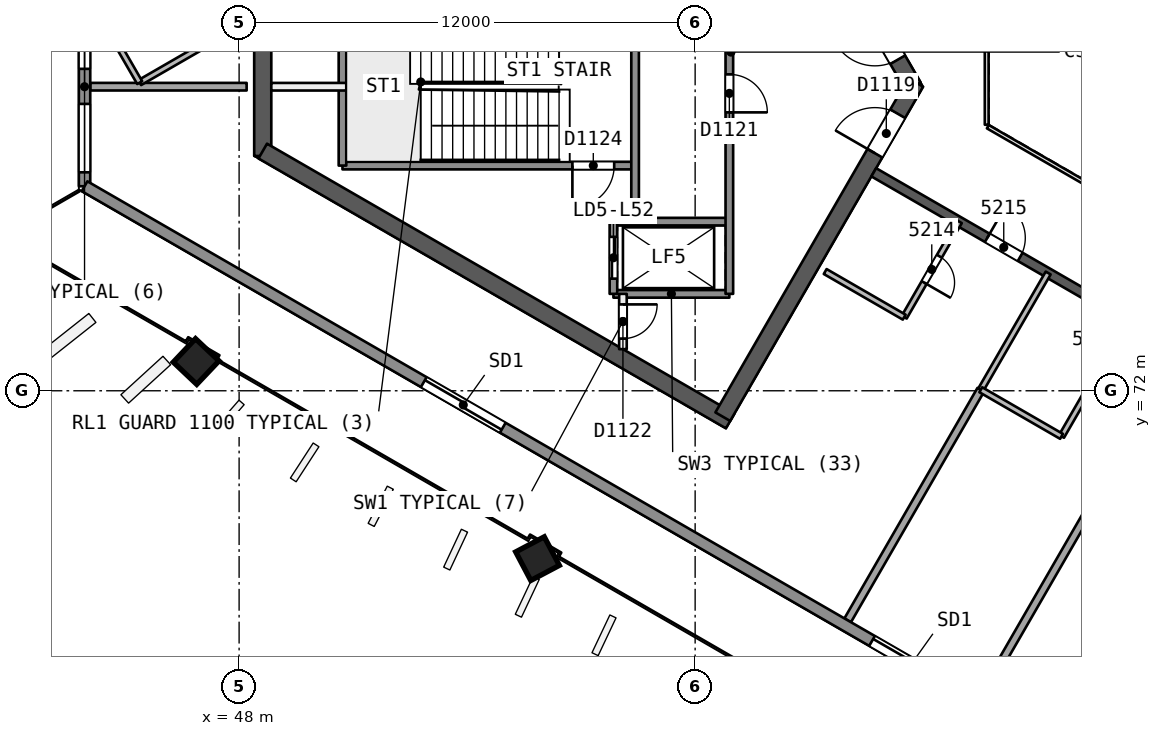
"""IFC4 building model, lengths in metres.
Left out: names, types, materials, properties, quantities, classifications, styles, units other than length and angle.
Written with IfcOpenShell. Run it as: python <this file> out.ifc"""

import sys

from ifc_helpers import new_model, si_unit, direction, frame, frame_2d, origin, origin_2d, place, context, subcontext, project, spatial, rectangle, extrude, element, fill, save


model = new_model("IFC4")
c1 = context("Model", 3, precision=1e-05, world=origin(), true_north=direction((0.0, 1.0)))
c2 = subcontext(c1, "Body", "Model", "MODEL_VIEW")
j1 = project(units=[si_unit("LENGTHUNIT", "METRE"), si_unit("PLANEANGLEUNIT", "RADIAN")], contexts=[c1])
p1 = place(None, origin())
s1 = spatial("IfcSite", under=j1, at=p1, CompositionType="ELEMENT")
p2 = place(p1, origin())
s2 = spatial("IfcBuilding", under=s1, at=p2, CompositionType="ELEMENT")
p3 = place(p2, frame((0.0, 0.0, 213.2)))
s3 = spatial("IfcBuildingStorey", under=s2, at=p3, CompositionType="ELEMENT", Elevation=213.2)
p4 = place(p3, frame((65.74, 80.0, 0.0), z_axis=(0.0, 0.0, 1.0), x_axis=(-0.499991857942, 0.866030104553, 0.0)))
e1 = element("IfcWall", 1, at=p4, inside=s3, PredefinedType="SHEAR", context=c2, shape_type="SweptSolid", body=[
    extrude(rectangle(XDim=10.25, YDim=0.45, at=frame_2d((5.125, 0.0))), origin(), (0.0, 0.0, 1.0), 3.7),
])
p5 = place(p4, frame((0.82, 0.0, 0.0)))
e2 = element("IfcOpeningElement", 2, at=p5, cuts=e1, PredefinedType="OPENING", context=c2, shape_type="SweptSolid", body=[
    extrude(rectangle(XDim=1.2, YDim=2.1, at=frame_2d((0.6, 1.05))), frame((0.0, 0.235, 0.0), z_axis=(0.0, -1.0, 0.0), x_axis=(1.0, 0.0, 0.0)), (0.0, 0.0, 1.0), 0.471),
])
p6 = place(p3, frame((48.622, 81.693, 0.0), z_axis=(0.0, 0.0, 1.0), x_axis=(0.0, -1.0, 0.0)))
e3 = element("IfcWall", 3, at=p6, inside=s3, PredefinedType="SHEAR", context=c2, shape_type="SweptSolid", body=[
    extrude(rectangle(XDim=3.515, YDim=0.45, at=frame_2d((1.758, 0.0))), origin(), (0.0, 0.0, 1.0), 3.7),
])
p7 = place(p3, frame((48.622, 78.307, 0.0), z_axis=(0.0, 0.0, 1.0), x_axis=(0.86602701116, -0.499997215934, 0.0)))
e4 = element("IfcWall", 4, at=p7, inside=s3, PredefinedType="SHEAR", context=c2, shape_type="SweptSolid", body=[
    extrude(rectangle(XDim=14.204, YDim=0.45, at=frame_2d((7.102, 0.0))), origin(), (0.0, 0.0, 1.0), 3.7),
])
p8 = place(p3, frame((60.728, 71.318, 0.0), z_axis=(0.0, 0.0, 1.0), x_axis=(0.500012416173, 0.866018235185, 0.0)))
e5 = element("IfcWall", 5, at=p8, inside=s3, PredefinedType="SHEAR", context=c2, shape_type="SweptSolid", body=[
    extrude(rectangle(XDim=10.155, YDim=0.45, at=frame_2d((5.078, 0.0))), origin(), (0.0, 0.0, 1.0), 3.7),
])
p9 = place(p8, frame((8.005, 0.0, 0.0)))
e6 = element("IfcOpeningElement", 6, at=p9, cuts=e5, PredefinedType="OPENING", context=c2, shape_type="SweptSolid", body=[
    extrude(rectangle(XDim=1.2, YDim=2.1, at=frame_2d((0.6, 1.05))), frame((0.0, 0.235, 0.0), z_axis=(0.0, -1.0, 0.0), x_axis=(1.0, 0.0, 0.0)), (0.0, 0.0, 1.0), 0.471),
])
p10 = place(p3, frame((64.7, 77.748, 0.0), z_axis=(0.0, 0.0, 1.0), x_axis=(0.866026492143, -0.499998114903, 0.0)))
e7 = element("IfcWall", 7, at=p10, inside=s3, PredefinedType="SHEAR", context=c2, shape_type="SweptSolid", body=[
    extrude(rectangle(XDim=15.588, YDim=0.25, at=frame_2d((7.794, 0.0))), origin(), (0.0, 0.0, 1.0), 3.3),
])
p11 = place(p10, frame((3.45, 0.0, 0.0)))
e8 = element("IfcOpeningElement", 8, at=p11, cuts=e7, PredefinedType="OPENING", context=c2, shape_type="SweptSolid", body=[
    extrude(rectangle(XDim=1.0, YDim=2.1, at=frame_2d((0.5, 1.05))), frame((0.0, 0.135, 0.0), z_axis=(0.0, -1.0, 0.0), x_axis=(1.0, 0.0, 0.0)), (0.0, 0.0, 1.0), 0.271),
])
p12 = place(p10, frame((8.003, 0.0, 0.0)))
e9 = element("IfcOpeningElement", 9, at=p12, cuts=e7, PredefinedType="OPENING", context=c2, shape_type="SweptSolid", body=[
    extrude(rectangle(XDim=1.1, YDim=2.1, at=frame_2d((0.55, 1.05))), frame((0.0, 0.135, 0.0), z_axis=(0.0, -1.0, 0.0), x_axis=(1.0, 0.0, 0.0)), (0.0, 0.0, 1.0), 0.271),
])
p13 = place(p10, frame((11.971, 0.0, 0.0)))
e10 = element("IfcOpeningElement", 10, at=p13, cuts=e7, PredefinedType="OPENING", context=c2, shape_type="SweptSolid", body=[
    extrude(rectangle(XDim=1.0, YDim=2.1, at=frame_2d((0.5, 1.05))), frame((0.0, 0.135, 0.0), z_axis=(0.0, -1.0, 0.0), x_axis=(1.0, 0.0, 0.0)), (0.0, 0.0, 1.0), 0.271),
])
p14 = place(p3, frame((46.835, 72.761, 0.0), z_axis=(0.02855911485, 0.006793507689, 0.999569019734), x_axis=(-0.865318766308, 0.500768301983, 0.021319953197)))
e11 = element("IfcColumn", 11, at=p14, inside=s3, PredefinedType="COLUMN", context=c2, shape_type="SweptSolid", body=[
    extrude(rectangle(XDim=0.85, YDim=0.85, at=origin_2d()), origin(), (0.0, 0.0, 1.0), 3.702),
])
p15 = place(p3, frame((55.83, 67.568, 0.0), z_axis=(0.019328516974, 0.012138044789, 0.999739504221), x_axis=(-0.865690909737, 0.500465383244, 0.010660627254)))
e12 = element("IfcColumn", 12, at=p15, inside=s3, PredefinedType="COLUMN", context=c2, shape_type="SweptSolid", body=[
    extrude(rectangle(XDim=0.85, YDim=0.85, at=origin_2d()), origin(), (0.0, 0.0, 1.0), 3.701),
])
p16 = place(p3, frame((47.636, 81.408, 0.0), z_axis=(0.0, 0.0, 1.0), x_axis=(-0.866021400173, -0.500006934395, 0.0)))
e13 = element("IfcWall", 13, at=p16, inside=s3, PredefinedType="PARTITIONING", context=c2, shape_type="SweptSolid", body=[
    extrude(rectangle(XDim=2.6, YDim=0.15, at=frame_2d((1.3, 0.0))), origin(), (0.0, 0.0, 1.0), 3.3),
])
p17 = place(p3, frame((45.384, 80.108, 0.0), z_axis=(0.0, 0.0, 1.0), x_axis=(-0.499949632511, 0.866054481515, 0.0)))
e14 = element("IfcWall", 14, at=p17, inside=s3, PredefinedType="PARTITIONING", context=c2, shape_type="SweptSolid", body=[
    extrude(rectangle(XDim=2.605, YDim=0.15, at=frame_2d((1.302, 0.0))), origin(), (0.0, 0.0, 1.0), 3.3),
])
p18 = place(p3, frame((44.082, 80.001, 0.0), z_axis=(0.0, 0.0, 1.0), x_axis=(1.0, 0.0, 0.0)))
e15 = element("IfcWall", 15, at=p18, inside=s3, PredefinedType="PARTITIONING", context=c2, shape_type="SweptSolid", body=[
    extrude(rectangle(XDim=4.116, YDim=0.2, at=frame_2d((2.058, 0.0))), origin(), (0.0, 0.0, 1.0), 3.3),
])
p19 = place(p3, frame((66.952, 76.448, 0.0), z_axis=(0.0, 0.0, 1.0), x_axis=(-0.499987231761, -0.866032775405, 0.0)))
e16 = element("IfcWall", 16, at=p19, inside=s3, PredefinedType="PARTITIONING", context=c2, shape_type="SweptSolid", body=[
    extrude(rectangle(XDim=2.9, YDim=0.15, at=frame_2d((1.45, 0.0))), origin(), (0.0, 0.0, 1.0), 3.3),
])
p20 = place(p19, frame((1.05, 0.0, 0.0)))
e17 = element("IfcOpeningElement", 17, at=p20, cuts=e16, PredefinedType="OPENING", context=c2, shape_type="SweptSolid", body=[
    extrude(rectangle(XDim=0.8, YDim=2.1, at=frame_2d((0.4, 1.05))), frame((0.0, 0.085, 0.0), z_axis=(0.0, -1.0, 0.0), x_axis=(1.0, 0.0, 0.0)), (0.0, 0.0, 1.0), 0.171),
])
p21 = place(p3, frame((65.502, 73.937, 0.0), z_axis=(0.0, 0.0, 1.0), x_axis=(-0.865994240961, 0.500053971709, 0.0)))
e18 = element("IfcWall", 18, at=p21, inside=s3, PredefinedType="PARTITIONING", context=c2, shape_type="SweptSolid", body=[
    extrude(rectangle(XDim=2.401, YDim=0.15, at=frame_2d((1.201, 0.0))), origin(), (0.0, 0.0, 1.0), 3.3),
])
p22 = place(p3, frame((64.014, 65.96, 0.0), z_axis=(0.0, 0.0, 1.0), x_axis=(0.499980879723, 0.8660364426, 0.0)))
e19 = element("IfcWall", 19, at=p22, inside=s3, PredefinedType="PARTITIONING", context=c2, shape_type="SweptSolid", body=[
    extrude(rectangle(XDim=7.006, YDim=0.2, at=frame_2d((3.503, 0.0))), origin(), (0.0, 0.0, 1.0), 3.3),
])
p23 = place(p3, frame((67.517, 72.027, 0.0), z_axis=(0.0, 0.0, 1.0), x_axis=(0.500018392462, 0.866014784631, 0.0)))
e20 = element("IfcWall", 20, at=p23, inside=s3, PredefinedType="PARTITIONING", context=c2, shape_type="SweptSolid", body=[
    extrude(rectangle(XDim=3.547, YDim=0.15, at=frame_2d((1.773, 0.0))), origin(), (0.0, 0.0, 1.0), 3.3),
])
p24 = place(p3, frame((71.414, 73.872, 0.0), z_axis=(0.0, 0.0, 1.0), x_axis=(-0.499966764714, -0.866044591335, 0.0)))
e21 = element("IfcWall", 21, at=p24, inside=s3, PredefinedType="PARTITIONING", context=c2, shape_type="SweptSolid", body=[
    extrude(rectangle(XDim=3.547, YDim=0.15, at=frame_2d((1.773, 0.0))), origin(), (0.0, 0.0, 1.0), 3.3),
])
p25 = place(p24, frame((1.323, 0.0, 0.0)))
e22 = element("IfcOpeningElement", 22, at=p25, cuts=e21, PredefinedType="OPENING", context=c2, shape_type="SweptSolid", body=[
    extrude(rectangle(XDim=0.9, YDim=2.1, at=frame_2d((0.45, 1.05))), frame((0.0, 0.085, 0.0), z_axis=(0.0, -1.0, 0.0), x_axis=(1.0, 0.0, 0.0)), (0.0, 0.0, 1.0), 0.171),
])
p26 = place(p3, frame((69.641, 70.8, 0.0), z_axis=(0.0, 0.0, 1.0), x_axis=(-0.866029801145, 0.49999238347, 0.0)))
e23 = element("IfcWall", 23, at=p26, inside=s3, PredefinedType="PARTITIONING", context=c2, shape_type="SweptSolid", body=[
    extrude(rectangle(XDim=2.453, YDim=0.15, at=frame_2d((1.227, 0.0))), origin(), (0.0, 0.0, 1.0), 3.3),
])
p27 = place(p3, frame((67.524, 63.933, 0.0), z_axis=(0.0, 0.0, 1.0), x_axis=(0.499993488173, 0.866029163357, 0.0)))
e24 = element("IfcWall", 24, at=p27, inside=s3, PredefinedType="PARTITIONING", context=c2, shape_type="SweptSolid", body=[
    extrude(rectangle(XDim=10.552, YDim=0.2, at=frame_2d((5.276, 0.0))), origin(), (0.0, 0.0, 1.0), 3.3),
])
p28 = place(p3, frame((43.933, 77.381, 0.0), z_axis=(0.0, 0.0, 1.0), x_axis=(0.0, 1.0, 0.0)))
e25 = element("IfcWall", 25, at=p28, inside=s3, PredefinedType="SOLIDWALL", context=c2, shape_type="SweptSolid", body=[
    extrude(rectangle(XDim=5.237, YDim=0.3, at=frame_2d((2.619, 0.0))), origin(), (0.0, 0.0, 1.0), 3.3),
])
p29 = place(p28, frame((3.089, 0.0, 0.9)))
e26 = element("IfcOpeningElement", 26, at=p29, cuts=e25, PredefinedType="OPENING", context=c2, shape_type="SweptSolid", body=[
    extrude(rectangle(XDim=1.8, YDim=1.5, at=frame_2d((0.9, 0.75))), frame((0.0, 0.161, 0.0), z_axis=(0.0, -1.0, 0.0), x_axis=(1.0, 0.0, 0.0)), (0.0, 0.0, 1.0), 0.321),
])
p30 = place(p28, frame((0.366, 0.0, 0.9)))
e27 = element("IfcOpeningElement", 27, at=p30, cuts=e25, PredefinedType="OPENING", context=c2, shape_type="SweptSolid", body=[
    extrude(rectangle(XDim=1.8, YDim=1.5, at=frame_2d((0.9, 0.75))), frame((0.0, 0.161, 0.0), z_axis=(0.0, -1.0, 0.0), x_axis=(1.0, 0.0, 0.0)), (0.0, 0.0, 1.0), 0.321),
])
p31 = place(p3, frame((88.266, 51.786, 0.0), z_axis=(0.0, 0.0, 1.0), x_axis=(-0.866026349667, 0.49999836168, 0.0)))
e28 = element("IfcWall", 28, at=p31, inside=s3, PredefinedType="SOLIDWALL", context=c2, shape_type="SweptSolid", body=[
    extrude(rectangle(XDim=51.192, YDim=0.3, at=frame_2d((25.596, 0.0))), origin(), (0.0, 0.0, 1.0), 3.3),
])
p32 = place(p31, frame((24.864, 0.0, 0.0)))
e29 = element("IfcOpeningElement", 29, at=p32, cuts=e28, PredefinedType="OPENING", context=c2, shape_type="SweptSolid", body=[
    extrude(rectangle(XDim=2.4, YDim=2.4, at=frame_2d((1.2, 1.2))), frame((0.0, 0.161, 0.0), z_axis=(0.0, -1.0, 0.0), x_axis=(1.0, 0.0, 0.0)), (0.0, 0.0, 1.0), 0.321),
])
p33 = place(p31, frame((19.719, 0.0, 0.0)))
e30 = element("IfcOpeningElement", 30, at=p33, cuts=e28, PredefinedType="OPENING", context=c2, shape_type="SweptSolid", body=[
    extrude(rectangle(XDim=2.4, YDim=2.4, at=frame_2d((1.2, 1.2))), frame((0.0, 0.161, 0.0), z_axis=(0.0, -1.0, 0.0), x_axis=(1.0, 0.0, 0.0)), (0.0, 0.0, 1.0), 0.321),
])
p34 = place(p31, frame((8.993, 0.0, 0.0)))
e31 = element("IfcOpeningElement", 31, at=p34, cuts=e28, PredefinedType="OPENING", context=c2, shape_type="SweptSolid", body=[
    extrude(rectangle(XDim=2.4, YDim=2.4, at=frame_2d((1.2, 1.2))), frame((0.0, 0.161, 0.0), z_axis=(0.0, -1.0, 0.0), x_axis=(1.0, 0.0, 0.0)), (0.0, 0.0, 1.0), 0.321),
])
p35 = place(p31, frame((38.484, 0.0, 0.0)))
e32 = element("IfcOpeningElement", 32, at=p35, cuts=e28, PredefinedType="OPENING", context=c2, shape_type="SweptSolid", body=[
    extrude(rectangle(XDim=2.4, YDim=2.4, at=frame_2d((1.2, 1.2))), frame((0.0, 0.161, 0.0), z_axis=(0.0, -1.0, 0.0), x_axis=(1.0, 0.0, 0.0)), (0.0, 0.0, 1.0), 0.321),
])
p36 = place(p3, frame((50.82, 80.0, 0.0), z_axis=(0.0, 0.0, 1.0), x_axis=(-1.0, 0.0, 0.0)))
e33 = element("IfcWall", 33, at=p36, inside=s3, PredefinedType="PARTITIONING", context=c2, shape_type="SweptSolid", body=[
    extrude(rectangle(XDim=1.973, YDim=0.2, at=frame_2d((0.987, 0.0))), origin(), (0.0, 0.0, 1.0), 3.3),
])
p37 = place(p3, frame((58.42, 77.925, 0.0), z_axis=(0.0, 0.0, 1.0), x_axis=(-1.0, 0.0, 0.0)))
e34 = element("IfcWall", 34, at=p37, inside=s3, PredefinedType="SOLIDWALL", context=c2, shape_type="SweptSolid", body=[
    extrude(rectangle(XDim=7.7, YDim=0.2, at=frame_2d((3.85, 0.0))), origin(), (0.0, 0.0, 1.0), 3.3),
])
p38 = place(p37, frame((0.55, 0.0, 0.0)))
e35 = element("IfcOpeningElement", 35, at=p38, cuts=e34, PredefinedType="OPENING", context=c2, shape_type="SweptSolid", body=[
    extrude(rectangle(XDim=1.1, YDim=2.1, at=frame_2d((0.55, 1.05))), frame((0.0, 0.11, 0.0), z_axis=(0.0, -1.0, 0.0), x_axis=(1.0, 0.0, 0.0)), (0.0, 0.0, 1.0), 0.221),
])
for number, where, z_axis, x_axis in (
    (36, (60.9, 76.45, 0.0), (0.0, 0.0, 1.0), (-1.0, 0.0, 0.0)),
    (37, (60.9, 74.55, 0.0), (0.0, 0.0, 1.0), (-1.0, 0.0, 0.0)),
):
    element("IfcWall", number, at=place(p3, frame(where, z_axis=z_axis, x_axis=x_axis)), inside=s3, PredefinedType="SOLIDWALL", context=c2, shape_type="SweptSolid", body=[
        extrude(rectangle(XDim=3.05, YDim=0.2, at=frame_2d((1.525, 0.0))), origin(), (0.0, 0.0, 1.0), 3.3),
    ])
p39 = place(p3, frame((60.9, 85.45, 0.0), z_axis=(0.0, 0.0, 1.0), x_axis=(0.0, -1.0, 0.0)))
e38 = element("IfcWall", 38, at=p39, inside=s3, PredefinedType="SOLIDWALL", context=c2, shape_type="SweptSolid", body=[
    extrude(rectangle(XDim=10.9, YDim=0.2, at=frame_2d((5.45, 0.0))), origin(), (0.0, 0.0, 1.0), 3.3),
])
p40 = place(p39, frame((0.625, 0.0, 0.0)))
e39 = element("IfcOpeningElement", 39, at=p40, cuts=e38, PredefinedType="OPENING", context=c2, shape_type="SweptSolid", body=[
    extrude(rectangle(XDim=1.0, YDim=2.1, at=frame_2d((0.5, 1.05))), frame((0.0, 0.11, 0.0), z_axis=(0.0, -1.0, 0.0), x_axis=(1.0, 0.0, 0.0)), (0.0, 0.0, 1.0), 0.221),
])
p41 = place(p39, frame((5.125, 0.0, 0.0)))
e40 = element("IfcOpeningElement", 40, at=p41, cuts=e38, PredefinedType="OPENING", context=c2, shape_type="SweptSolid", body=[
    extrude(rectangle(XDim=1.0, YDim=2.1, at=frame_2d((0.5, 1.05))), frame((0.0, 0.11, 0.0), z_axis=(0.0, -1.0, 0.0), x_axis=(1.0, 0.0, 0.0)), (0.0, 0.0, 1.0), 0.221),
])
p42 = place(p3, frame((58.42, 87.09, 0.0), z_axis=(0.0, 0.0, 1.0), x_axis=(0.0, -1.0, 0.0)))
e41 = element("IfcWall", 41, at=p42, inside=s3, PredefinedType="SOLIDWALL", context=c2, shape_type="SweptSolid", body=[
    extrude(rectangle(XDim=10.64, YDim=0.2, at=frame_2d((5.32, 0.0))), origin(), (0.0, 0.0, 1.0), 3.3),
])
p43 = place(p42, frame((0.37, 0.0, 0.0)))
e42 = element("IfcOpeningElement", 42, at=p43, cuts=e41, PredefinedType="OPENING", context=c2, shape_type="SweptSolid", body=[
    extrude(rectangle(XDim=0.9, YDim=2.1, at=frame_2d((0.45, 1.05))), frame((0.0, 0.11, 0.0), z_axis=(0.0, -1.0, 0.0), x_axis=(1.0, 0.0, 0.0)), (0.0, 0.0, 1.0), 0.221),
])
p44 = place(p3, frame((58.1, 74.55, 0.0), z_axis=(0.0, 0.0, 1.0), x_axis=(0.0, -1.0, 0.0)))
e43 = element("IfcWall", 43, at=p44, inside=s3, PredefinedType="PARTITIONING", context=c2, shape_type="SweptSolid", body=[
    extrude(rectangle(XDim=1.455, YDim=0.2, at=frame_2d((0.728, 0.0))), origin(), (0.0, 0.0, 1.0), 3.3),
])
p45 = place(p44, frame((0.278, 0.0, 0.0)))
e44 = element("IfcOpeningElement", 44, at=p45, cuts=e43, PredefinedType="OPENING", context=c2, shape_type="SweptSolid", body=[
    extrude(rectangle(XDim=0.9, YDim=2.1, at=frame_2d((0.45, 1.05))), frame((0.0, 0.11, 0.0), z_axis=(0.0, -1.0, 0.0), x_axis=(1.0, 0.0, 0.0)), (0.0, 0.0, 1.0), 0.221),
])
p46 = place(p3, frame((57.85, 76.45, 0.0), z_axis=(0.0, 0.0, 1.0), x_axis=(0.0, -1.0, 0.0)))
e45 = element("IfcWall", 45, at=p46, inside=s3, PredefinedType="SOLIDWALL", context=c2, shape_type="SweptSolid", body=[
    extrude(rectangle(XDim=1.9, YDim=0.2, at=frame_2d((0.95, 0.0))), origin(), (0.0, 0.0, 1.0), 3.3),
])
p47 = place(p46, frame((0.4, 0.0, 0.0)))
e46 = element("IfcOpeningElement", 46, at=p47, cuts=e45, PredefinedType="OPENING", context=c2, shape_type="SweptSolid", body=[
    extrude(rectangle(XDim=1.1, YDim=2.1, at=frame_2d((0.55, 1.05))), frame((0.0, 0.11, 0.0), z_axis=(0.0, -1.0, 0.0), x_axis=(1.0, 0.0, 0.0)), (0.0, 0.0, 1.0), 0.221),
])
p48 = place(p3, frame((50.72, 82.075, 0.0), z_axis=(0.0, 0.0, 1.0), x_axis=(0.0, -1.0, 0.0)))
e47 = element("IfcWall", 47, at=p48, inside=s3, PredefinedType="SOLIDWALL", context=c2, shape_type="SweptSolid", body=[
    extrude(rectangle(XDim=4.15, YDim=0.2, at=frame_2d((2.075, 0.0))), origin(), (0.0, 0.0, 1.0), 3.3),
])
p49 = place(p3, frame((67.672, 81.0, 0.0), z_axis=(0.0, 0.0, 1.0), x_axis=(0.0, -1.0, 0.0)))
e48 = element("IfcWall", 48, at=p49, inside=s3, PredefinedType="PARTITIONING", context=c2, shape_type="SweptSolid", body=[
    extrude(rectangle(XDim=2.0, YDim=0.1, at=frame_2d((1.0, 0.0))), origin(), (0.0, 0.0, 1.0), 3.3),
])
p50 = place(p3, frame((67.702, 78.948, 0.0), z_axis=(0.0, 0.0, 1.0), x_axis=(0.866026658274, -0.499997827154, 0.0)))
e49 = element("IfcWall", 49, at=p50, inside=s3, PredefinedType="PARTITIONING", context=c2, shape_type="SweptSolid", body=[
    extrude(rectangle(XDim=11.588, YDim=0.1, at=frame_2d((5.794, 0.0))), origin(), (0.0, 0.0, 1.0), 3.3),
])
p51 = place(p20, origin())
e50 = element("IfcDoor", 50, at=p51, inside=s3, OperationType="SINGLE_SWING_RIGHT", PredefinedType="NOTDEFINED", context=c2, shape_type="SweptSolid", body=[
    extrude(rectangle(XDim=0.8, YDim=2.1, at=frame_2d((0.4, 1.05))), frame((0.0, 0.025, 0.0), z_axis=(0.0, -1.0, 0.0), x_axis=(1.0, 0.0, 0.0)), (0.0, 0.0, 1.0), 0.05),
])
fill(e17, e50)
p52 = place(p11, origin())
e51 = element("IfcDoor", 51, at=p52, inside=s3, OperationType="SINGLE_SWING_LEFT", PredefinedType="NOTDEFINED", context=c2, shape_type="SweptSolid", body=[
    extrude(rectangle(XDim=1.0, YDim=2.1, at=frame_2d((0.5, 1.05))), frame((0.0, 0.025, 0.0), z_axis=(0.0, -1.0, 0.0), x_axis=(1.0, 0.0, 0.0)), (0.0, 0.0, 1.0), 0.05),
])
fill(e8, e51)
p53 = place(p29, origin())
e52 = element("IfcWindow", 52, at=p53, inside=s3, PartitioningType="SINGLE_PANEL", PredefinedType="WINDOW", context=c2, shape_type="SweptSolid", body=[
    extrude(rectangle(XDim=1.8, YDim=1.5, at=frame_2d((0.9, 0.75))), frame((0.0, 0.03, 0.0), z_axis=(0.0, -1.0, 0.0), x_axis=(1.0, 0.0, 0.0)), (0.0, 0.0, 1.0), 0.06),
])
fill(e26, e52)
p54 = place(p30, origin())
e53 = element("IfcWindow", 53, at=p54, inside=s3, PartitioningType="SINGLE_PANEL", PredefinedType="WINDOW", context=c2, shape_type="SweptSolid", body=[
    extrude(rectangle(XDim=1.8, YDim=1.5, at=frame_2d((0.9, 0.75))), frame((0.0, 0.03, 0.0), z_axis=(0.0, -1.0, 0.0), x_axis=(1.0, 0.0, 0.0)), (0.0, 0.0, 1.0), 0.06),
])
fill(e27, e53)
p55 = place(p32, origin())
e54 = element("IfcDoor", 54, at=p55, inside=s3, OperationType="SLIDING_TO_LEFT", PredefinedType="NOTDEFINED", context=c2, shape_type="SweptSolid", body=[
    extrude(rectangle(XDim=2.4, YDim=2.4, at=frame_2d((1.2, 1.2))), frame((0.0, 0.025, 0.0), z_axis=(0.0, -1.0, 0.0), x_axis=(1.0, 0.0, 0.0)), (0.0, 0.0, 1.0), 0.05),
])
fill(e29, e54)
p56 = place(p35, origin())
e55 = element("IfcDoor", 55, at=p56, inside=s3, OperationType="SLIDING_TO_RIGHT", PredefinedType="NOTDEFINED", context=c2, shape_type="SweptSolid", body=[
    extrude(rectangle(XDim=2.4, YDim=2.4, at=frame_2d((1.2, 1.2))), frame((0.0, 0.025, 0.0), z_axis=(0.0, -1.0, 0.0), x_axis=(1.0, 0.0, 0.0)), (0.0, 0.0, 1.0), 0.05),
])
fill(e32, e55)
p57 = place(p5, origin())
e56 = element("IfcDoor", 56, at=p57, inside=s3, OperationType="SINGLE_SWING_RIGHT", PredefinedType="NOTDEFINED", context=c2, shape_type="SweptSolid", body=[
    extrude(rectangle(XDim=1.2, YDim=2.1, at=frame_2d((0.6, 1.05))), frame((0.0, 0.025, 0.0), z_axis=(0.0, -1.0, 0.0), x_axis=(1.0, 0.0, 0.0)), (0.0, 0.0, 1.0), 0.05),
])
fill(e2, e56)
p58 = place(p9, origin())
e57 = element("IfcDoor", 57, at=p58, inside=s3, OperationType="SINGLE_SWING_LEFT", PredefinedType="NOTDEFINED", context=c2, shape_type="SweptSolid", body=[
    extrude(rectangle(XDim=1.2, YDim=2.1, at=frame_2d((0.6, 1.05))), frame((0.0, 0.025, 0.0), z_axis=(0.0, -1.0, 0.0), x_axis=(1.0, 0.0, 0.0)), (0.0, 0.0, 1.0), 0.05),
])
fill(e6, e57)
p59 = place(p47, origin())
e58 = element("IfcDoor", 58, at=p59, inside=s3, OperationType="SLIDING_TO_RIGHT", PredefinedType="NOTDEFINED", context=c2, shape_type="SweptSolid", body=[
    extrude(rectangle(XDim=1.1, YDim=2.1, at=frame_2d((0.55, 1.05))), frame((0.0, 0.025, 0.0), z_axis=(0.0, -1.0, 0.0), x_axis=(1.0, 0.0, 0.0)), (0.0, 0.0, 1.0), 0.05),
])
fill(e46, e58)
p60 = place(p41, origin())
e59 = element("IfcDoor", 59, at=p60, inside=s3, OperationType="SINGLE_SWING_RIGHT", PredefinedType="NOTDEFINED", context=c2, shape_type="SweptSolid", body=[
    extrude(rectangle(XDim=1.0, YDim=2.1, at=frame_2d((0.5, 1.05))), frame((0.0, 0.025, 0.0), z_axis=(0.0, -1.0, 0.0), x_axis=(1.0, 0.0, 0.0)), (0.0, 0.0, 1.0), 0.05),
])
fill(e40, e59)
p61 = place(p45, origin())
e60 = element("IfcDoor", 60, at=p61, inside=s3, OperationType="SINGLE_SWING_LEFT", PredefinedType="NOTDEFINED", context=c2, shape_type="SweptSolid", body=[
    extrude(rectangle(XDim=0.9, YDim=2.1, at=frame_2d((0.45, 1.05))), frame((0.0, 0.025, 0.0), z_axis=(0.0, -1.0, 0.0), x_axis=(1.0, 0.0, 0.0)), (0.0, 0.0, 1.0), 0.05),
])
fill(e44, e60)
p62 = place(p38, origin())
e61 = element("IfcDoor", 61, at=p62, inside=s3, OperationType="SINGLE_SWING_RIGHT", PredefinedType="NOTDEFINED", context=c2, shape_type="SweptSolid", body=[
    extrude(rectangle(XDim=1.1, YDim=2.1, at=frame_2d((0.55, 1.05))), frame((0.0, 0.025, 0.0), z_axis=(0.0, -1.0, 0.0), x_axis=(1.0, 0.0, 0.0)), (0.0, 0.0, 1.0), 0.05),
])
fill(e35, e61)
save(model, sys.argv[1])
